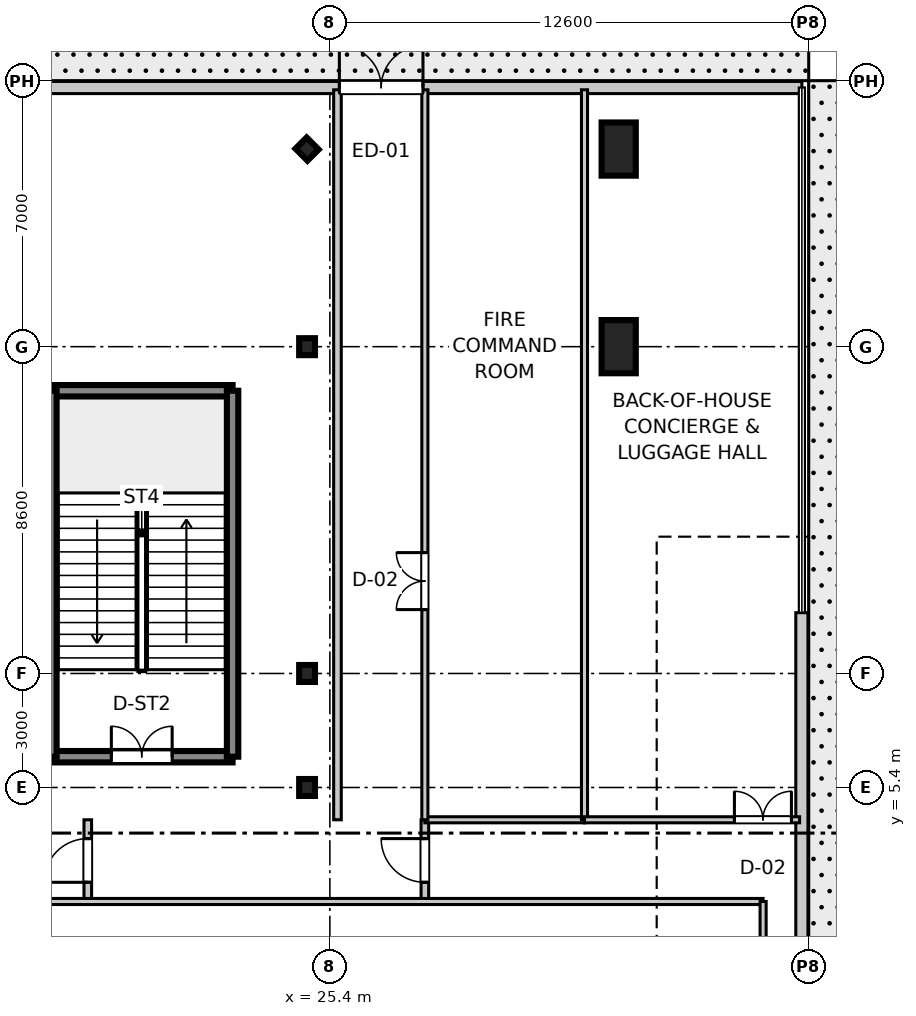
"""IFC4 building model, lengths in metres.
Left out: names, types, materials, properties, quantities, classifications, styles, units other than length and angle.
Written with IfcOpenShell. Run it as: python <this file> out.ifc"""

import sys

from ifc_helpers import new_model, si_unit, direction, frame, frame_2d, origin, origin_2d, place, context, subcontext, project, spatial, rectangle, i_section, extrude, source, transform, mapped, element, fill, save


model = new_model("IFC4")
c1 = context("Model", 3, precision=1e-05, world=origin(), true_north=direction((0.0, 1.0)))
c2 = subcontext(c1, "Body", "Model", "MODEL_VIEW")
j1 = project(units=[si_unit("LENGTHUNIT", "METRE"), si_unit("PLANEANGLEUNIT", "RADIAN")], contexts=[c1])
p1 = place(None, origin())
s1 = spatial("IfcSite", under=j1, at=p1, CompositionType="ELEMENT")
p2 = place(p1, origin())
s2 = spatial("IfcBuilding", under=s1, at=p2, CompositionType="ELEMENT")
p3 = place(p2, origin())
s3 = spatial("IfcBuildingStorey", under=s2, at=p3, CompositionType="ELEMENT", Elevation=0.0)
m1 = source(origin(), c2, "Body", "SweptSolid", [
    extrude(rectangle(XDim=0.9, YDim=1.4, at=origin_2d()), origin(), (0.0, 0.0, 1.0), 5.355),
])
for number, where, z_axis, x_axis in (
    (1, (33.0, 17.0, 0.0), (0.0, 0.0, 1.0), (1.0, 0.0, 0.0)),
    (2, (33.0, 22.2, 0.0), (0.0, 0.0, 1.0), (1.0, 0.0, 0.0)),
):
    element("IfcColumn", number, at=place(p3, frame(where, z_axis=z_axis, x_axis=x_axis)), inside=s3, PredefinedType="PILASTER", context=c2, shape_type="MappedRepresentation", body=[
        mapped(m1, transform((0.0, 0.0, 0.0), scale=1.0)),
    ])
m2 = source(origin(), c2, "Body", "SweptSolid", [
    extrude(i_section(OverallWidth=0.416, OverallDepth=0.446, WebThickness=0.025, FlangeThickness=0.04, at=origin_2d()), origin(), (0.0, 0.0, 1.0), 5.355),
])
for number, where, z_axis, x_axis in (
    (3, (24.8, 5.4, 0.0), (0.0, 0.0, 1.0), (1.0, 0.0, 0.0)),
    (4, (24.8, 8.4, 0.0), (0.0, 0.0, 1.0), (1.0, 0.0, 0.0)),
    (5, (24.8, 17.0, 0.0), (0.0, 0.0, 1.0), (1.0, 0.0, 0.0)),
    (6, (24.8, 22.2, 0.0), (0.0, 0.0, 1.0), (0.707, 0.707, 0.0)),
):
    element("IfcColumn", number, at=place(p3, frame(where, z_axis=z_axis, x_axis=x_axis)), inside=s3, PredefinedType="COLUMN", context=c2, shape_type="MappedRepresentation", body=[
        mapped(m2, transform((0.0, 0.0, 0.0), scale=1.0)),
    ])
m3 = source(origin(), c2, "Body", "SweptSolid", [
    extrude(rectangle(XDim=4.78, YDim=0.3, at=frame_2d((2.39, 0.0))), origin(), (0.0, 0.0, 1.0), 5.08),
])
p4 = place(p3, frame((18.06, 6.21, 0.0), z_axis=(0.0, 0.0, 1.0), x_axis=(1.0, 0.0, 0.0)))
e7 = element("IfcWall", 7, at=p4, inside=s3, PredefinedType="SHEAR", context=c2, shape_type="MappedRepresentation", body=[
    mapped(m3, transform((0.0, 0.0, 0.0), scale=1.0)),
])
p5 = place(p4, frame((1.59, 0.0, 0.0)))
e8 = element("IfcOpeningElement", 8, at=p5, cuts=e7, PredefinedType="OPENING", context=c2, shape_type="SweptSolid", body=[
    extrude(rectangle(XDim=1.6, YDim=2.2, at=frame_2d((0.8, 1.1))), frame((0.0, 0.16, 0.0), z_axis=(0.0, -1.0, 0.0), x_axis=(1.0, 0.0, 0.0)), (0.0, 0.0, 1.0), 0.32),
])
p6 = place(p3, frame((18.06, 15.84, 0.0), z_axis=(0.0, 0.0, 1.0), x_axis=(1.0, 0.0, 0.0)))
e9 = element("IfcWall", 9, at=p6, inside=s3, PredefinedType="SHEAR", context=c2, shape_type="MappedRepresentation", body=[
    mapped(m3, transform((0.0, 0.0, 0.0), scale=1.0)),
])
m4 = source(origin(), c2, "Body", "SweptSolid", [
    extrude(rectangle(XDim=9.63, YDim=0.3, at=frame_2d((4.815, 0.0))), origin(), (0.0, 0.0, 1.0), 5.08),
])
for number, where, z_axis, x_axis in (
    (10, (18.06, 6.21, 0.0), (0.0, 0.0, 1.0), (0.0, 1.0, 0.0)),
    (11, (22.84, 6.21, 0.0), (0.0, 0.0, 1.0), (0.0, 1.0, 0.0)),
):
    element("IfcWall", number, at=place(p3, frame(where, z_axis=z_axis, x_axis=x_axis)), inside=s3, PredefinedType="SHEAR", context=c2, shape_type="MappedRepresentation", body=[
        mapped(m4, transform((0.0, 0.0, 0.0), scale=1.0)),
    ])
m5 = source(origin(), c2, "Body", "SweptSolid", [
    extrude(rectangle(XDim=27.02, YDim=0.32, at=frame_2d((13.51, 0.0))), origin(), (0.0, 0.0, 1.0), 5.08),
])
p7 = place(p3, frame((10.8, 23.82, 0.0), z_axis=(0.0, 0.0, 1.0), x_axis=(1.0, 0.0, 0.0)))
e12 = element("IfcWall", 12, at=p7, inside=s3, PredefinedType="STANDARD", context=c2, shape_type="MappedRepresentation", body=[
    mapped(m5, transform((0.0, 0.0, 0.0), scale=1.0)),
])
p8 = place(p7, frame((0.6, 0.0, 0.0)))
e13 = element("IfcOpeningElement", 13, at=p8, cuts=e12, PredefinedType="OPENING", context=c2, shape_type="SweptSolid", body=[
    extrude(rectangle(XDim=2.2, YDim=2.6, at=frame_2d((1.1, 1.3))), frame((0.0, 0.17, 0.0), z_axis=(0.0, -1.0, 0.0), x_axis=(1.0, 0.0, 0.0)), (0.0, 0.0, 1.0), 0.34),
])
p9 = place(p7, frame((14.85, 0.0, 0.0)))
e14 = element("IfcOpeningElement", 14, at=p9, cuts=e12, PredefinedType="OPENING", context=c2, shape_type="SweptSolid", body=[
    extrude(rectangle(XDim=2.2, YDim=2.6, at=frame_2d((1.1, 1.3))), frame((0.0, 0.17, 0.0), z_axis=(0.0, -1.0, 0.0), x_axis=(1.0, 0.0, 0.0)), (0.0, 0.0, 1.0), 0.34),
])
m6 = source(origin(), c2, "Body", "SweptSolid", [
    extrude(rectangle(XDim=20.0, YDim=0.32, at=frame_2d((10.0, 0.0))), origin(), (0.0, 0.0, 1.0), 5.08),
])
p10 = place(p3, frame((37.82, -10.0, 0.0), z_axis=(0.0, 0.0, 1.0), x_axis=(0.0, 1.0, 0.0)))
e15 = element("IfcWall", 15, at=p10, inside=s3, PredefinedType="STANDARD", context=c2, shape_type="MappedRepresentation", body=[
    mapped(m6, transform((0.0, 0.0, 0.0), scale=1.0)),
])
p11 = place(p10, frame((8.9, 0.0, 0.0)))
e16 = element("IfcOpeningElement", 16, at=p11, cuts=e15, PredefinedType="OPENING", context=c2, shape_type="SweptSolid", body=[
    extrude(rectangle(XDim=2.2, YDim=2.6, at=frame_2d((1.1, 1.3))), frame((0.0, 0.17, 0.0), z_axis=(0.0, -1.0, 0.0), x_axis=(1.0, 0.0, 0.0)), (0.0, 0.0, 1.0), 0.34),
])
m7 = source(origin(), c2, "Body", "SweptSolid", [
    extrude(rectangle(XDim=2.15, YDim=0.2, at=frame_2d((1.075, 0.0))), origin(), (0.0, 0.0, 1.0), 3.4),
])
p12 = place(p3, frame((19.03, 2.4, 0.0), z_axis=(0.0, 0.0, 1.0), x_axis=(0.0, 1.0, 0.0)))
e17 = element("IfcWall", 17, at=p12, inside=s3, PredefinedType="PARTITIONING", context=c2, shape_type="MappedRepresentation", body=[
    mapped(m7, transform((0.0, 0.0, 0.0), scale=1.0)),
])
p13 = place(p12, frame((0.505, 0.0, 0.0)))
e18 = element("IfcOpeningElement", 18, at=p13, cuts=e17, PredefinedType="OPENING", context=c2, shape_type="SweptSolid", body=[
    extrude(rectangle(XDim=1.15, YDim=2.15, at=frame_2d((0.575, 1.075))), frame((0.0, 0.11, 0.0), z_axis=(0.0, -1.0, 0.0), x_axis=(1.0, 0.0, 0.0)), (0.0, 0.0, 1.0), 0.22),
])
m8 = source(origin(), c2, "Body", "SweptSolid", [
    extrude(rectangle(XDim=19.21, YDim=0.2, at=frame_2d((9.605, 0.0))), origin(), (0.0, 0.0, 1.0), 3.4),
])
p14 = place(p3, frame((25.6, 4.55, 0.0), z_axis=(0.0, 0.0, 1.0), x_axis=(0.0, 1.0, 0.0)))
e19 = element("IfcWall", 19, at=p14, inside=s3, PredefinedType="PARTITIONING", context=c2, shape_type="MappedRepresentation", body=[
    mapped(m8, transform((0.0, 0.0, 0.0), scale=1.0)),
])
p15 = place(p3, frame((27.9, 2.4, 0.0), z_axis=(0.0, 0.0, 1.0), x_axis=(0.0, 1.0, 0.0)))
e20 = element("IfcWall", 20, at=p15, inside=s3, PredefinedType="PARTITIONING", context=c2, shape_type="MappedRepresentation", body=[
    mapped(m7, transform((0.0, 0.0, 0.0), scale=1.0)),
])
p16 = place(p15, frame((0.505, 0.0, 0.0)))
e21 = element("IfcOpeningElement", 21, at=p16, cuts=e20, PredefinedType="OPENING", context=c2, shape_type="SweptSolid", body=[
    extrude(rectangle(XDim=1.15, YDim=2.15, at=frame_2d((0.575, 1.075))), frame((0.0, 0.11, 0.0), z_axis=(0.0, -1.0, 0.0), x_axis=(1.0, 0.0, 0.0)), (0.0, 0.0, 1.0), 0.22),
])
m9 = source(origin(), c2, "Body", "SweptSolid", [
    extrude(rectangle(XDim=20.15, YDim=0.16, at=frame_2d((10.075, 0.0))), origin(), (0.0, 0.0, 1.0), 3.4),
])
p17 = place(p3, frame((16.65, 2.4, 0.0), z_axis=(0.0, 0.0, 1.0), x_axis=(1.0, 0.0, 0.0)))
e22 = element("IfcWall", 22, at=p17, inside=s3, PredefinedType="PARTITIONING", context=c2, shape_type="MappedRepresentation", body=[
    mapped(m9, transform((0.0, 0.0, 0.0), scale=1.0)),
])
m10 = source(origin(), c2, "Body", "SweptSolid", [
    extrude(rectangle(XDim=4.8, YDim=0.16, at=frame_2d((2.4, 0.0))), origin(), (0.0, 0.0, 1.0), 3.4),
])
p18 = place(p3, frame((36.8, -2.4, 0.0), z_axis=(0.0, 0.0, 1.0), x_axis=(0.0, 1.0, 0.0)))
e23 = element("IfcWall", 23, at=p18, inside=s3, PredefinedType="PARTITIONING", context=c2, shape_type="MappedRepresentation", body=[
    mapped(m10, transform((0.0, 0.0, 0.0), scale=1.0)),
])
m11 = source(origin(), c2, "Body", "SweptSolid", [
    extrude(rectangle(XDim=4.2, YDim=0.16, at=frame_2d((2.1, 0.0))), origin(), (0.0, 0.0, 1.0), 3.4),
])
p19 = place(p3, frame((27.9, 4.55, 0.0), z_axis=(0.0, 0.0, 1.0), x_axis=(1.0, 0.0, 0.0)))
e24 = element("IfcWall", 24, at=p19, inside=s3, PredefinedType="PARTITIONING", context=c2, shape_type="MappedRepresentation", body=[
    mapped(m11, transform((0.0, 0.0, 0.0), scale=1.0)),
])
m12 = source(origin(), c2, "Body", "SweptSolid", [
    extrude(rectangle(XDim=19.21, YDim=0.16, at=frame_2d((9.605, 0.0))), origin(), (0.0, 0.0, 1.0), 3.4),
])
p20 = place(p3, frame((27.9, 4.55, 0.0), z_axis=(0.0, 0.0, 1.0), x_axis=(0.0, 1.0, 0.0)))
e25 = element("IfcWall", 25, at=p20, inside=s3, PredefinedType="PARTITIONING", context=c2, shape_type="MappedRepresentation", body=[
    mapped(m12, transform((0.0, 0.0, 0.0), scale=1.0)),
])
p21 = place(p20, frame((5.531, 0.0, 0.0)))
e26 = element("IfcOpeningElement", 26, at=p21, cuts=e25, PredefinedType="OPENING", context=c2, shape_type="SweptSolid", body=[
    extrude(rectangle(XDim=1.5, YDim=2.15, at=frame_2d((0.75, 1.075))), frame((0.0, 0.09, 0.0), z_axis=(0.0, -1.0, 0.0), x_axis=(1.0, 0.0, 0.0)), (0.0, 0.0, 1.0), 0.18),
])
p22 = place(p3, frame((32.1, 4.55, 0.0), z_axis=(0.0, 0.0, 1.0), x_axis=(0.0, 1.0, 0.0)))
e27 = element("IfcWall", 27, at=p22, inside=s3, PredefinedType="PARTITIONING", context=c2, shape_type="MappedRepresentation", body=[
    mapped(m12, transform((0.0, 0.0, 0.0), scale=1.0)),
])
m13 = source(origin(), c2, "Body", "SweptSolid", [
    extrude(rectangle(XDim=5.66, YDim=0.16, at=frame_2d((2.83, 0.0))), origin(), (0.0, 0.0, 1.0), 3.4),
])
p23 = place(p3, frame((32.1, 4.55, 0.0), z_axis=(0.0, 0.0, 1.0), x_axis=(1.0, 0.0, 0.0)))
e28 = element("IfcWall", 28, at=p23, inside=s3, PredefinedType="PARTITIONING", context=c2, shape_type="MappedRepresentation", body=[
    mapped(m13, transform((0.0, 0.0, 0.0), scale=1.0)),
])
p24 = place(p23, frame((3.945, 0.0, 0.0)))
e29 = element("IfcOpeningElement", 29, at=p24, cuts=e28, PredefinedType="OPENING", context=c2, shape_type="SweptSolid", body=[
    extrude(rectangle(XDim=1.5, YDim=2.15, at=frame_2d((0.75, 1.075))), frame((0.0, 0.09, 0.0), z_axis=(0.0, -1.0, 0.0), x_axis=(1.0, 0.0, 0.0)), (0.0, 0.0, 1.0), 0.18),
])
m14 = source(origin(), c2, "Body", "SweptSolid", [
    extrude(rectangle(XDim=1.6, YDim=2.2, at=frame_2d((0.8, 1.1))), frame((0.0, 0.025, 0.0), z_axis=(0.0, -1.0, 0.0), x_axis=(1.0, 0.0, 0.0)), (0.0, 0.0, 1.0), 0.05),
])
p25 = place(p5, frame((1.6, 0.0, 0.0), z_axis=(0.0, 0.0, 1.0), x_axis=(-1.0, 0.0, 0.0)))
e30 = element("IfcDoor", 30, at=p25, inside=s3, OperationType="DOUBLE_DOOR_SINGLE_SWING", PredefinedType="DOOR", context=c2, shape_type="MappedRepresentation", body=[
    mapped(m14, transform((0.0, 0.0, 0.0), scale=1.0)),
])
fill(e8, e30)
m15 = source(origin(), c2, "Body", "SweptSolid", [
    extrude(rectangle(XDim=2.2, YDim=2.6, at=frame_2d((1.1, 1.3))), frame((0.0, 0.025, 0.0), z_axis=(0.0, -1.0, 0.0), x_axis=(1.0, 0.0, 0.0)), (0.0, 0.0, 1.0), 0.05),
])
p26 = place(p9, origin())
e31 = element("IfcDoor", 31, at=p26, inside=s3, OperationType="DOUBLE_DOOR_SINGLE_SWING", PredefinedType="DOOR", context=c2, shape_type="MappedRepresentation", body=[
    mapped(m15, transform((0.0, 0.0, 0.0), scale=1.0)),
])
fill(e14, e31)
m16 = source(origin(), c2, "Body", "SweptSolid", [
    extrude(rectangle(XDim=1.15, YDim=2.15, at=frame_2d((0.575, 1.075))), frame((0.0, 0.025, 0.0), z_axis=(0.0, -1.0, 0.0), x_axis=(1.0, 0.0, 0.0)), (0.0, 0.0, 1.0), 0.05),
])
p27 = place(p13, frame((1.15, 0.0, 0.0), z_axis=(0.0, 0.0, 1.0), x_axis=(-1.0, 0.0, 0.0)))
e32 = element("IfcDoor", 32, at=p27, inside=s3, OperationType="SINGLE_SWING_LEFT", PredefinedType="DOOR", context=c2, shape_type="MappedRepresentation", body=[
    mapped(m16, transform((0.0, 0.0, 0.0), scale=1.0)),
])
fill(e18, e32)
p28 = place(p16, origin())
e33 = element("IfcDoor", 33, at=p28, inside=s3, OperationType="SINGLE_SWING_RIGHT", PredefinedType="DOOR", context=c2, shape_type="MappedRepresentation", body=[
    mapped(m16, transform((0.0, 0.0, 0.0), scale=1.0)),
])
fill(e21, e33)
m17 = source(origin(), c2, "Body", "SweptSolid", [
    extrude(rectangle(XDim=1.5, YDim=2.15, at=frame_2d((0.75, 1.075))), frame((0.0, 0.025, 0.0), z_axis=(0.0, -1.0, 0.0), x_axis=(1.0, 0.0, 0.0)), (0.0, 0.0, 1.0), 0.05),
])
p29 = place(p21, frame((1.5, 0.0, 0.0), z_axis=(0.0, 0.0, 1.0), x_axis=(-1.0, 0.0, 0.0)))
e34 = element("IfcDoor", 34, at=p29, inside=s3, OperationType="DOUBLE_DOOR_SINGLE_SWING", PredefinedType="DOOR", context=c2, shape_type="MappedRepresentation", body=[
    mapped(m17, transform((0.0, 0.0, 0.0), scale=1.0)),
])
fill(e26, e34)
p30 = place(p24, origin())
e35 = element("IfcDoor", 35, at=p30, inside=s3, OperationType="DOUBLE_DOOR_SINGLE_SWING", PredefinedType="DOOR", context=c2, shape_type="MappedRepresentation", body=[
    mapped(m17, transform((0.0, 0.0, 0.0), scale=1.0)),
])
fill(e29, e35)
save(model, sys.argv[1])
